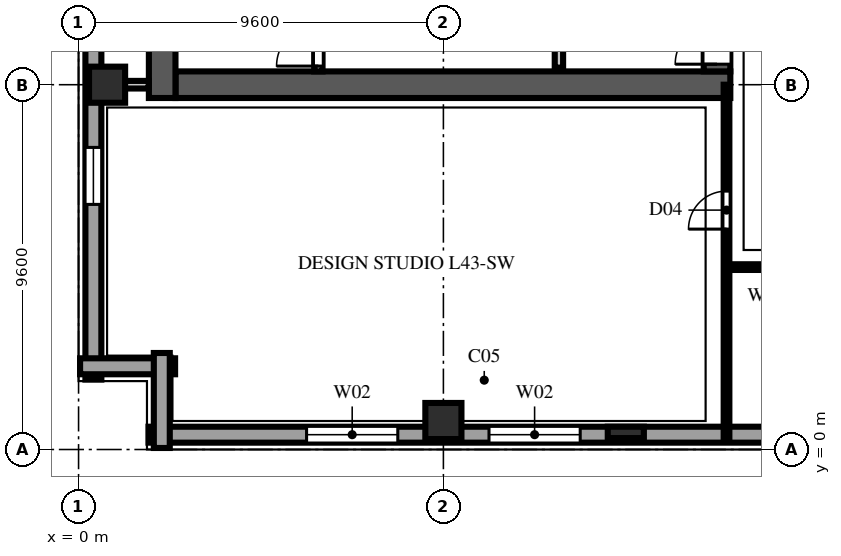
"""IFC4 building model, lengths in metres.
Left out: names, types, materials, properties, quantities, classifications, styles, units other than length and angle.
Written with IfcOpenShell. Run it as: python <this file> out.ifc"""

import sys

from ifc_helpers import new_model, si_unit, direction, frame, frame_2d, origin, origin_2d, place, context, subcontext, project, spatial, rectangle, extrude, element, fill, save


model = new_model("IFC4")
c1 = context("Model", 3, precision=1e-05, world=origin(), true_north=direction((0.0, 1.0)))
c2 = subcontext(c1, "Body", "Model", "MODEL_VIEW")
j1 = project(units=[si_unit("LENGTHUNIT", "METRE"), si_unit("PLANEANGLEUNIT", "RADIAN")], contexts=[c1])
p1 = place(None, origin())
s1 = spatial("IfcSite", under=j1, at=p1, CompositionType="ELEMENT")
p2 = place(p1, origin())
s2 = spatial("IfcBuilding", under=s1, at=p2, CompositionType="ELEMENT")
p3 = place(p2, frame((0.0, 0.0, 171.2)))
s3 = spatial("IfcBuildingStorey", under=s2, at=p3, CompositionType="ELEMENT", Elevation=171.2)
p4 = place(p3, frame((2.55, 9.6, 0.0), z_axis=(0.0, 0.0, 1.0), x_axis=(1.0, 0.0, 0.0)))
e1 = element("IfcWall", 1, at=p4, inside=s3, PredefinedType="SHEAR", context=c2, shape_type="SweptSolid", body=[
    extrude(rectangle(XDim=14.6, YDim=0.7, at=frame_2d((7.3, 0.0))), origin(), (0.0, 0.0, 1.0), 3.54),
])
p5 = place(p3, frame((2.2, 9.25, 0.0), z_axis=(0.0, 0.0, 1.0), x_axis=(0.0, 1.0, 0.0)))
e2 = element("IfcWall", 2, at=p5, inside=s3, PredefinedType="SHEAR", context=c2, shape_type="SweptSolid", body=[
    extrude(rectangle(XDim=39.1, YDim=0.7, at=frame_2d((19.55, 0.0))), origin(), (0.0, 0.0, 1.0), 3.54),
])
p6 = place(p3, frame((16.8, 9.95, 0.0), z_axis=(0.0, 0.0, 1.0), x_axis=(0.0, 1.0, 0.0)))
e3 = element("IfcWall", 3, at=p6, inside=s3, PredefinedType="SHEAR", context=c2, shape_type="SweptSolid", body=[
    extrude(rectangle(XDim=12.45, YDim=0.7, at=frame_2d((6.225, 0.0))), origin(), (0.0, 0.0, 1.0), 3.54),
])
p7 = place(p6, frame((0.19, 0.0, 0.0)))
e4 = element("IfcOpeningElement", 4, at=p7, cuts=e3, PredefinedType="OPENING", context=c2, shape_type="SweptSolid", body=[
    extrude(rectangle(XDim=1.1, YDim=2.2, at=frame_2d((0.55, 1.1))), frame((0.0, 0.362, 0.0), z_axis=(0.0, -1.0, 0.0), x_axis=(1.0, 0.0, 0.0)), (0.0, 0.0, 1.0), 0.724),
])
for number, where, z_axis, x_axis in (
    (5, (0.75, 9.6, 0.0), (0.0, 0.0, 1.0), (1.0, 0.0, 0.0)),
    (6, (9.6, 0.75, 0.0), (0.0, 0.0, 1.0), (1.0, 0.0, 0.0)),
):
    element("IfcColumn", number, at=place(p3, frame(where, z_axis=z_axis, x_axis=x_axis)), inside=s3, PredefinedType="COLUMN", context=c2, shape_type="SweptSolid", body=[
        extrude(rectangle(XDim=0.95, YDim=0.95, at=origin_2d()), origin(), (0.0, 0.0, 1.0), 3.8),
    ])
p8 = place(p3, frame((14.4, 0.45, 0.0), z_axis=(0.0, 0.0, 1.0), x_axis=(1.0, 0.0, 0.0)))
e7 = element("IfcColumn", 7, at=p8, inside=s3, PredefinedType="PILASTER", context=c2, shape_type="SweptSolid", body=[
    extrude(rectangle(XDim=0.95, YDim=0.3, at=origin_2d()), origin(), (0.0, 0.0, 1.0), 3.8),
])
p9 = place(p3, frame((1.84, 0.39, 0.0), z_axis=(0.0, 0.0, 1.0), x_axis=(1.0, 0.0, 0.0)))
e8 = element("IfcWall", 8, at=p9, inside=s3, PredefinedType="SOLIDWALL", context=c2, shape_type="SweptSolid", body=[
    extrude(rectangle(XDim=53.92, YDim=0.42, at=frame_2d((26.96, 0.0))), origin(), (0.0, 0.0, 1.0), 3.54),
])
p10 = place(p9, frame((4.16, 0.0, 0.85)))
e9 = element("IfcOpeningElement", 9, at=p10, cuts=e8, PredefinedType="OPENING", context=c2, shape_type="SweptSolid", body=[
    extrude(rectangle(XDim=2.4, YDim=1.85, at=frame_2d((1.2, 0.925))), frame((0.0, 0.222, 0.0), z_axis=(0.0, -1.0, 0.0), x_axis=(1.0, 0.0, 0.0)), (0.0, 0.0, 1.0), 0.444),
])
p11 = place(p9, frame((8.96, 0.0, 0.85)))
e10 = element("IfcOpeningElement", 10, at=p11, cuts=e8, PredefinedType="OPENING", context=c2, shape_type="SweptSolid", body=[
    extrude(rectangle(XDim=2.4, YDim=1.85, at=frame_2d((1.2, 0.925))), frame((0.0, 0.222, 0.0), z_axis=(0.0, -1.0, 0.0), x_axis=(1.0, 0.0, 0.0)), (0.0, 0.0, 1.0), 0.444),
])
p12 = place(p9, frame((18.56, 0.0, 0.85)))
e11 = element("IfcOpeningElement", 11, at=p12, cuts=e8, PredefinedType="OPENING", context=c2, shape_type="SweptSolid", body=[
    extrude(rectangle(XDim=2.4, YDim=1.85, at=frame_2d((1.2, 0.925))), frame((0.0, 0.222, 0.0), z_axis=(0.0, -1.0, 0.0), x_axis=(1.0, 0.0, 0.0)), (0.0, 0.0, 1.0), 0.444),
])
p13 = place(p9, frame((28.16, 0.0, 0.85)))
e12 = element("IfcOpeningElement", 12, at=p13, cuts=e8, PredefinedType="OPENING", context=c2, shape_type="SweptSolid", body=[
    extrude(rectangle(XDim=2.4, YDim=1.85, at=frame_2d((1.2, 0.925))), frame((0.0, 0.222, 0.0), z_axis=(0.0, -1.0, 0.0), x_axis=(1.0, 0.0, 0.0)), (0.0, 0.0, 1.0), 0.444),
])
p14 = place(p3, frame((0.39, 65.36, 0.0), z_axis=(0.0, 0.0, 1.0), x_axis=(0.0, -1.0, 0.0)))
e13 = element("IfcWall", 13, at=p14, inside=s3, PredefinedType="SOLIDWALL", context=c2, shape_type="SweptSolid", body=[
    extrude(rectangle(XDim=63.52, YDim=0.42, at=frame_2d((31.76, 0.0))), origin(), (0.0, 0.0, 1.0), 3.54),
])
p15 = place(p14, frame((4.885, 0.0, 0.9)))
e14 = element("IfcOpeningElement", 14, at=p15, cuts=e13, PredefinedType="OPENING", context=c2, shape_type="SweptSolid", body=[
    extrude(rectangle(XDim=0.95, YDim=1.85, at=frame_2d((0.475, 0.925))), frame((0.0, 0.222, 0.0), z_axis=(0.0, -1.0, 0.0), x_axis=(1.0, 0.0, 0.0)), (0.0, 0.0, 1.0), 0.444),
])
p16 = place(p14, frame((9.41, 0.0, 0.9)))
e15 = element("IfcOpeningElement", 15, at=p16, cuts=e13, PredefinedType="OPENING", context=c2, shape_type="SweptSolid", body=[
    extrude(rectangle(XDim=1.5, YDim=1.85, at=frame_2d((0.75, 0.925))), frame((0.0, 0.222, 0.0), z_axis=(0.0, -1.0, 0.0), x_axis=(1.0, 0.0, 0.0)), (0.0, 0.0, 1.0), 0.444),
])
p17 = place(p14, frame((14.485, 0.0, 0.9)))
e16 = element("IfcOpeningElement", 16, at=p17, cuts=e13, PredefinedType="OPENING", context=c2, shape_type="SweptSolid", body=[
    extrude(rectangle(XDim=0.95, YDim=1.85, at=frame_2d((0.475, 0.925))), frame((0.0, 0.222, 0.0), z_axis=(0.0, -1.0, 0.0), x_axis=(1.0, 0.0, 0.0)), (0.0, 0.0, 1.0), 0.444),
])
p18 = place(p14, frame((19.01, 0.0, 0.9)))
e17 = element("IfcOpeningElement", 17, at=p18, cuts=e13, PredefinedType="OPENING", context=c2, shape_type="SweptSolid", body=[
    extrude(rectangle(XDim=1.5, YDim=1.85, at=frame_2d((0.75, 0.925))), frame((0.0, 0.222, 0.0), z_axis=(0.0, -1.0, 0.0), x_axis=(1.0, 0.0, 0.0)), (0.0, 0.0, 1.0), 0.444),
])
p19 = place(p14, frame((24.085, 0.0, 0.9)))
e18 = element("IfcOpeningElement", 18, at=p19, cuts=e13, PredefinedType="OPENING", context=c2, shape_type="SweptSolid", body=[
    extrude(rectangle(XDim=0.95, YDim=1.85, at=frame_2d((0.475, 0.925))), frame((0.0, 0.222, 0.0), z_axis=(0.0, -1.0, 0.0), x_axis=(1.0, 0.0, 0.0)), (0.0, 0.0, 1.0), 0.444),
])
p20 = place(p14, frame((28.61, 0.0, 0.9)))
e19 = element("IfcOpeningElement", 19, at=p20, cuts=e13, PredefinedType="OPENING", context=c2, shape_type="SweptSolid", body=[
    extrude(rectangle(XDim=1.5, YDim=1.85, at=frame_2d((0.75, 0.925))), frame((0.0, 0.222, 0.0), z_axis=(0.0, -1.0, 0.0), x_axis=(1.0, 0.0, 0.0)), (0.0, 0.0, 1.0), 0.444),
])
p21 = place(p14, frame((33.685, 0.0, 0.9)))
e20 = element("IfcOpeningElement", 20, at=p21, cuts=e13, PredefinedType="OPENING", context=c2, shape_type="SweptSolid", body=[
    extrude(rectangle(XDim=0.95, YDim=1.85, at=frame_2d((0.475, 0.925))), frame((0.0, 0.222, 0.0), z_axis=(0.0, -1.0, 0.0), x_axis=(1.0, 0.0, 0.0)), (0.0, 0.0, 1.0), 0.444),
])
p22 = place(p14, frame((38.21, 0.0, 0.9)))
e21 = element("IfcOpeningElement", 21, at=p22, cuts=e13, PredefinedType="OPENING", context=c2, shape_type="SweptSolid", body=[
    extrude(rectangle(XDim=1.5, YDim=1.85, at=frame_2d((0.75, 0.925))), frame((0.0, 0.222, 0.0), z_axis=(0.0, -1.0, 0.0), x_axis=(1.0, 0.0, 0.0)), (0.0, 0.0, 1.0), 0.444),
])
p23 = place(p14, frame((43.285, 0.0, 0.9)))
e22 = element("IfcOpeningElement", 22, at=p23, cuts=e13, PredefinedType="OPENING", context=c2, shape_type="SweptSolid", body=[
    extrude(rectangle(XDim=0.95, YDim=1.85, at=frame_2d((0.475, 0.925))), frame((0.0, 0.222, 0.0), z_axis=(0.0, -1.0, 0.0), x_axis=(1.0, 0.0, 0.0)), (0.0, 0.0, 1.0), 0.444),
])
p24 = place(p14, frame((47.81, 0.0, 0.9)))
e23 = element("IfcOpeningElement", 23, at=p24, cuts=e13, PredefinedType="OPENING", context=c2, shape_type="SweptSolid", body=[
    extrude(rectangle(XDim=1.5, YDim=1.85, at=frame_2d((0.75, 0.925))), frame((0.0, 0.222, 0.0), z_axis=(0.0, -1.0, 0.0), x_axis=(1.0, 0.0, 0.0)), (0.0, 0.0, 1.0), 0.444),
])
p25 = place(p14, frame((52.885, 0.0, 0.9)))
e24 = element("IfcOpeningElement", 24, at=p25, cuts=e13, PredefinedType="OPENING", context=c2, shape_type="SweptSolid", body=[
    extrude(rectangle(XDim=0.95, YDim=1.85, at=frame_2d((0.475, 0.925))), frame((0.0, 0.222, 0.0), z_axis=(0.0, -1.0, 0.0), x_axis=(1.0, 0.0, 0.0)), (0.0, 0.0, 1.0), 0.444),
])
p26 = place(p14, frame((57.41, 0.0, 0.9)))
e25 = element("IfcOpeningElement", 25, at=p26, cuts=e13, PredefinedType="OPENING", context=c2, shape_type="SweptSolid", body=[
    extrude(rectangle(XDim=1.5, YDim=1.85, at=frame_2d((0.75, 0.925))), frame((0.0, 0.222, 0.0), z_axis=(0.0, -1.0, 0.0), x_axis=(1.0, 0.0, 0.0)), (0.0, 0.0, 1.0), 0.444),
])
for number, where, z_axis, x_axis in (
    (26, (0.04, 2.19, 0.0), (0.0, 0.0, 1.0), (1.0, 0.0, 0.0)),
    (27, (2.19, 2.54, 0.0), (0.0, 0.0, 1.0), (0.0, -1.0, 0.0)),
):
    element("IfcWall", number, at=place(p3, frame(where, z_axis=z_axis, x_axis=x_axis)), inside=s3, PredefinedType="SOLIDWALL", context=c2, shape_type="SweptSolid", body=[
        extrude(rectangle(XDim=2.5, YDim=0.42, at=frame_2d((1.25, 0.0))), origin(), (0.0, 0.0, 1.0), 3.54),
    ])
p27 = place(p3, frame((6.31, 9.95, 0.0), z_axis=(0.0, 0.0, 1.0), x_axis=(0.0, 1.0, 0.0)))
e28 = element("IfcWall", 28, at=p27, inside=s3, PredefinedType="SOLIDWALL", context=c2, shape_type="SweptSolid", body=[
    extrude(rectangle(XDim=7.81, YDim=0.22, at=frame_2d((3.905, 0.0))), origin(), (0.0, 0.0, 1.0), 3.54),
])
p28 = place(p27, frame((0.14, 0.0, 0.0)))
e29 = element("IfcOpeningElement", 29, at=p28, cuts=e28, PredefinedType="OPENING", context=c2, shape_type="SweptSolid", body=[
    extrude(rectangle(XDim=1.1, YDim=2.2, at=frame_2d((0.55, 1.1))), frame((0.0, 0.122, 0.0), z_axis=(0.0, -1.0, 0.0), x_axis=(1.0, 0.0, 0.0)), (0.0, 0.0, 1.0), 0.244),
])
p29 = place(p3, frame((12.64, 10.05, 0.0), z_axis=(0.0, 0.0, 1.0), x_axis=(0.0, 1.0, 0.0)))
e30 = element("IfcWall", 30, at=p29, inside=s3, PredefinedType="SOLIDWALL", context=c2, shape_type="SweptSolid", body=[
    extrude(rectangle(XDim=7.71, YDim=0.22, at=frame_2d((3.855, 0.0))), origin(), (0.0, 0.0, 1.0), 3.54),
])
p30 = place(p3, frame((0.85, 9.6, 0.0), z_axis=(0.0, 0.0, 1.0), x_axis=(1.0, 0.0, 0.0)))
e31 = element("IfcWall", 31, at=p30, inside=s3, PredefinedType="SOLIDWALL", context=c2, shape_type="SweptSolid", body=[
    extrude(rectangle(XDim=0.995, YDim=0.2, at=frame_2d((0.498, 0.0))), origin(), (0.0, 0.0, 1.0), 2.923),
])
p31 = place(p3, frame((17.05, 4.8, 0.0), z_axis=(0.0, 0.0, 1.0), x_axis=(1.0, 0.0, 0.0)))
e32 = element("IfcWall", 32, at=p31, inside=s3, PredefinedType="PARTITIONING", context=c2, shape_type="SweptSolid", body=[
    extrude(rectangle(XDim=2.15, YDim=0.15, at=frame_2d((1.075, 0.0))), origin(), (0.0, 0.0, 1.0), 3.54),
])
p32 = place(p3, frame((17.05, 0.22, 0.0), z_axis=(0.0, 0.0, 1.0), x_axis=(0.0, 1.0, 0.0)))
e33 = element("IfcWall", 33, at=p32, inside=s3, PredefinedType="PARTITIONING", context=c2, shape_type="SweptSolid", body=[
    extrude(rectangle(XDim=9.38, YDim=0.15, at=frame_2d((4.69, 0.0))), origin(), (0.0, 0.0, 1.0), 3.54),
])
p33 = place(p32, frame((5.58, 0.0, 0.0)))
e34 = element("IfcOpeningElement", 34, at=p33, cuts=e33, PredefinedType="OPENING", context=c2, shape_type="SweptSolid", body=[
    extrude(rectangle(XDim=1.0, YDim=2.2, at=frame_2d((0.5, 1.1))), frame((0.0, 0.087, 0.0), z_axis=(0.0, -1.0, 0.0), x_axis=(1.0, 0.0, 0.0)), (0.0, 0.0, 1.0), 0.174),
])
p34 = place(p10, origin())
e35 = element("IfcWindow", 35, at=p34, inside=s3, PartitioningType="TRIPLE_PANEL_VERTICAL", PredefinedType="WINDOW", context=c2, shape_type="SweptSolid", body=[
    extrude(rectangle(XDim=2.4, YDim=1.85, at=frame_2d((1.2, 0.925))), frame((0.0, 0.11, 0.0), z_axis=(0.0, -1.0, 0.0), x_axis=(1.0, 0.0, 0.0)), (0.0, 0.0, 1.0), 0.06),
])
fill(e9, e35)
p35 = place(p11, origin())
e36 = element("IfcWindow", 36, at=p35, inside=s3, PartitioningType="TRIPLE_PANEL_VERTICAL", PredefinedType="WINDOW", context=c2, shape_type="SweptSolid", body=[
    extrude(rectangle(XDim=2.4, YDim=1.85, at=frame_2d((1.2, 0.925))), frame((0.0, 0.11, 0.0), z_axis=(0.0, -1.0, 0.0), x_axis=(1.0, 0.0, 0.0)), (0.0, 0.0, 1.0), 0.06),
])
fill(e10, e36)
p36 = place(p26, origin())
e37 = element("IfcWindow", 37, at=p36, inside=s3, PartitioningType="DOUBLE_PANEL_VERTICAL", PredefinedType="WINDOW", context=c2, shape_type="SweptSolid", body=[
    extrude(rectangle(XDim=1.5, YDim=1.85, at=frame_2d((0.75, 0.925))), frame((0.0, 0.11, 0.0), z_axis=(0.0, -1.0, 0.0), x_axis=(1.0, 0.0, 0.0)), (0.0, 0.0, 1.0), 0.06),
])
fill(e25, e37)
p37 = place(p28, origin())
e38 = element("IfcDoor", 38, at=p37, inside=s3, OperationType="SINGLE_SWING_LEFT", PredefinedType="DOOR", context=c2, shape_type="SweptSolid", body=[
    extrude(rectangle(XDim=1.1, YDim=2.2, at=frame_2d((0.55, 1.1))), frame((0.0, 0.025, 0.0), z_axis=(0.0, -1.0, 0.0), x_axis=(1.0, 0.0, 0.0)), (0.0, 0.0, 1.0), 0.05),
])
fill(e29, e38)
p38 = place(p7, origin())
e39 = element("IfcDoor", 39, at=p38, inside=s3, OperationType="SINGLE_SWING_LEFT", PredefinedType="DOOR", context=c2, shape_type="SweptSolid", body=[
    extrude(rectangle(XDim=1.1, YDim=2.2, at=frame_2d((0.55, 1.1))), frame((0.0, 0.025, 0.0), z_axis=(0.0, -1.0, 0.0), x_axis=(1.0, 0.0, 0.0)), (0.0, 0.0, 1.0), 0.05),
])
fill(e4, e39)
p39 = place(p33, origin())
e40 = element("IfcDoor", 40, at=p39, inside=s3, OperationType="SINGLE_SWING_LEFT", PredefinedType="DOOR", context=c2, shape_type="SweptSolid", body=[
    extrude(rectangle(XDim=1.0, YDim=2.2, at=frame_2d((0.5, 1.1))), frame((0.0, 0.025, 0.0), z_axis=(0.0, -1.0, 0.0), x_axis=(1.0, 0.0, 0.0)), (0.0, 0.0, 1.0), 0.05),
])
fill(e34, e40)
save(model, sys.argv[1])
